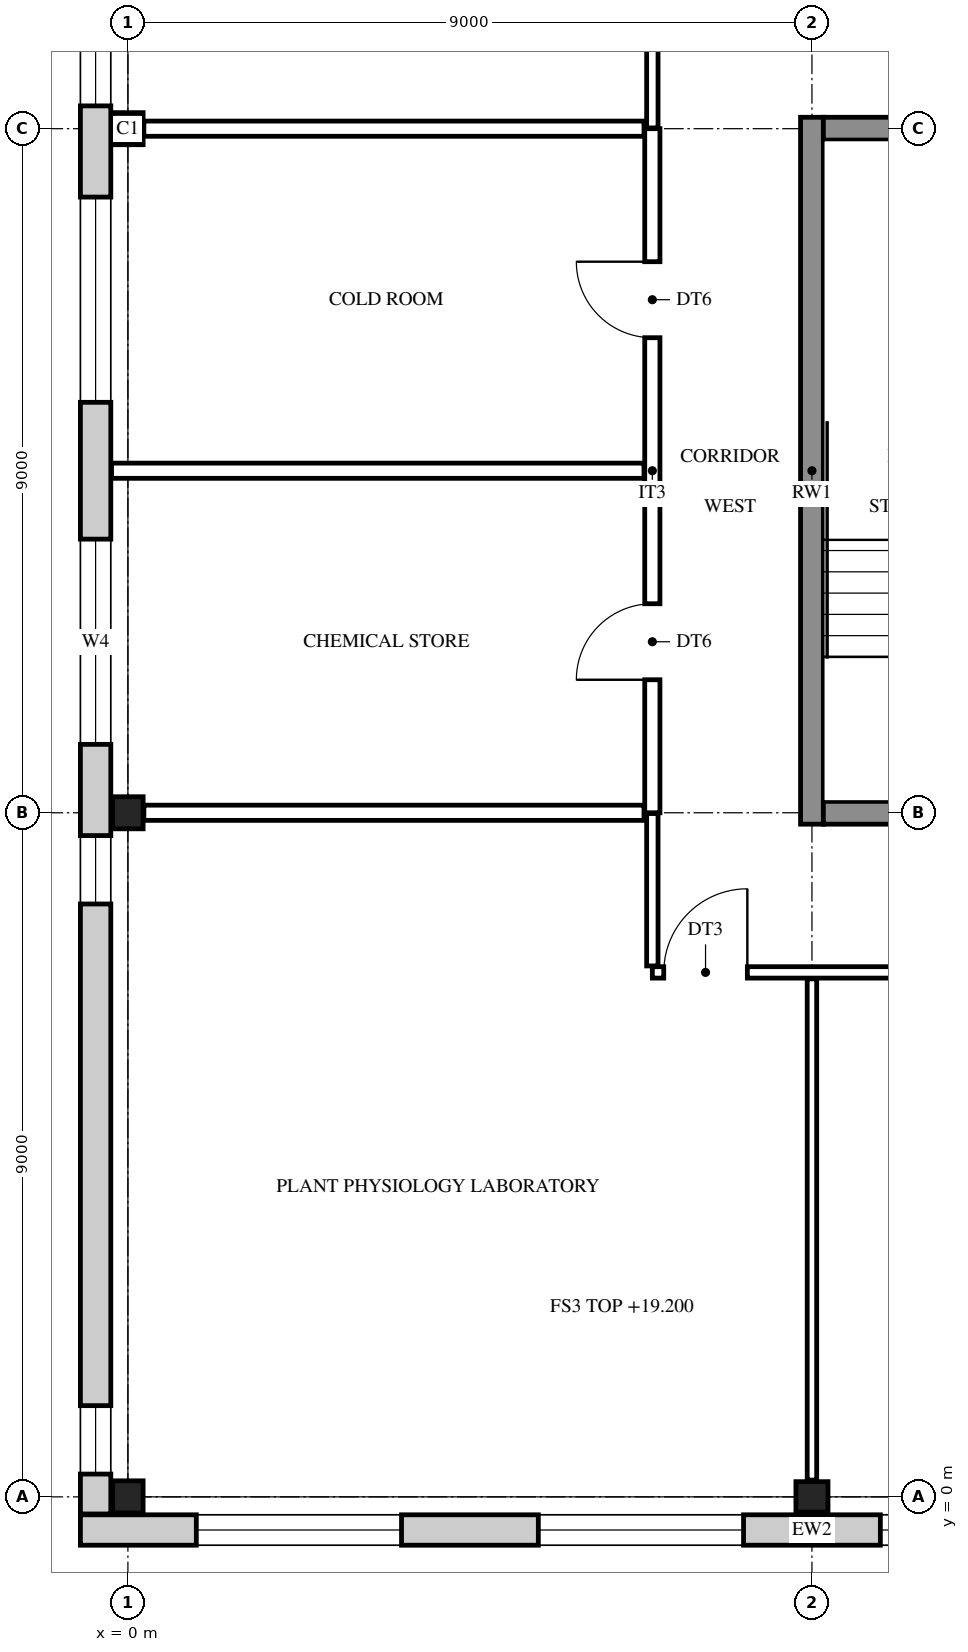
"""IFC4 building model, lengths in metres.
Left out: names, types, materials, properties, quantities, classifications, styles, units other than length and angle.
Written with IfcOpenShell. Run it as: python <this file> out.ifc"""

import sys

from ifc_helpers import new_model, si_unit, direction, frame, frame_2d, origin, origin_2d, place, context, subcontext, project, spatial, rectangle, i_section, extrude, element, fill, save


model = new_model("IFC4")
c1 = context("Model", 3, precision=1e-05, world=origin(), true_north=direction((0.0, 1.0)))
c2 = subcontext(c1, "Body", "Model", "MODEL_VIEW")
j1 = project(units=[si_unit("LENGTHUNIT", "METRE"), si_unit("PLANEANGLEUNIT", "RADIAN")], contexts=[c1])
p1 = place(None, origin())
s1 = spatial("IfcSite", under=j1, at=p1, CompositionType="ELEMENT")
p2 = place(p1, origin())
s2 = spatial("IfcBuilding", under=s1, at=p2, CompositionType="ELEMENT")
p3 = place(p2, frame((0.0, 0.0, 19.2)))
s3 = spatial("IfcBuildingStorey", under=s2, at=p3, CompositionType="ELEMENT", Elevation=19.2)
for number, where, z_axis, x_axis in (
    (1, (0.0, 0.0, 0.0), (0.0, 0.0, 1.0), (1.0, 0.0, 0.0)),
    (2, (0.0, 9.0, 0.0), (0.0, 0.0, 1.0), (1.0, 0.0, 0.0)),
    (3, (0.0, 18.0, 0.0), (0.0, 0.0, 1.0), (1.0, 0.0, 0.0)),
    (4, (9.0, 0.0, 0.0), (0.0, 0.0, 1.0), (0.0, 1.0, 0.0)),
):
    element("IfcColumn", number, at=place(p3, frame(where, z_axis=z_axis, x_axis=x_axis)), inside=s3, PredefinedType="COLUMN", context=c2, shape_type="SweptSolid", body=[
        extrude(i_section(OverallWidth=0.4, OverallDepth=0.422, WebThickness=0.028, FlangeThickness=0.036, at=origin_2d()), origin(), (0.0, 0.0, 1.0), 4.2),
    ])
p4 = place(p3, frame((9.0, 8.85, 0.0), z_axis=(0.0, 0.0, 1.0), x_axis=(0.0, 1.0, 0.0)))
e5 = element("IfcWall", 5, at=p4, inside=s3, PredefinedType="SHEAR", context=c2, shape_type="SweptSolid", body=[
    extrude(rectangle(XDim=9.3, YDim=0.3, at=frame_2d((4.65, 0.0))), origin(), (0.0, 0.0, 1.0), 4.2),
])
p5 = place(p3, frame((9.15, 9.0, 0.0), z_axis=(0.0, 0.0, 1.0), x_axis=(1.0, 0.0, 0.0)))
e6 = element("IfcWall", 6, at=p5, inside=s3, PredefinedType="SHEAR", context=c2, shape_type="SweptSolid", body=[
    extrude(rectangle(XDim=4.2, YDim=0.3, at=frame_2d((2.1, 0.0))), origin(), (0.0, 0.0, 1.0), 4.2),
])
p6 = place(p5, frame((1.5, 0.0, 0.0)))
e7 = element("IfcOpeningElement", 7, at=p6, cuts=e6, PredefinedType="OPENING", context=c2, shape_type="SweptSolid", body=[
    extrude(rectangle(XDim=1.2, YDim=2.1, at=frame_2d((0.6, 1.05))), frame((0.0, 0.16, 0.0), z_axis=(0.0, -1.0, 0.0), x_axis=(1.0, 0.0, 0.0)), (0.0, 0.0, 1.0), 0.32),
])
p7 = place(p3, frame((9.15, 18.0, 0.0), z_axis=(0.0, 0.0, 1.0), x_axis=(1.0, 0.0, 0.0)))
e8 = element("IfcWall", 8, at=p7, inside=s3, PredefinedType="SHEAR", context=c2, shape_type="SweptSolid", body=[
    extrude(rectangle(XDim=4.2, YDim=0.3, at=frame_2d((2.1, 0.0))), origin(), (0.0, 0.0, 1.0), 4.2),
])
p8 = place(p3, frame((32.125, -0.436, 0.0), z_axis=(0.0, 0.0, 1.0), x_axis=(-1.0, 0.0, 0.0)))
e9 = element("IfcWall", 9, at=p8, inside=s3, PredefinedType="STANDARD", context=c2, shape_type="SweptSolid", body=[
    extrude(rectangle(XDim=32.75, YDim=0.4, at=frame_2d((16.375, 0.0))), origin(), (0.0, 0.0, 1.0), 4.2),
])
p9 = place(p8, frame((28.525, 0.0, 0.9)))
e10 = element("IfcOpeningElement", 10, at=p9, cuts=e9, PredefinedType="OPENING", context=c2, shape_type="SweptSolid", body=[
    extrude(rectangle(XDim=2.7, YDim=2.5, at=frame_2d((1.35, 1.25))), frame((0.0, 0.21, 0.0), z_axis=(0.0, -1.0, 0.0), x_axis=(1.0, 0.0, 0.0)), (0.0, 0.0, 1.0), 0.42),
])
p10 = place(p8, frame((24.025, 0.0, 0.9)))
e11 = element("IfcOpeningElement", 11, at=p10, cuts=e9, PredefinedType="OPENING", context=c2, shape_type="SweptSolid", body=[
    extrude(rectangle(XDim=2.7, YDim=2.5, at=frame_2d((1.35, 1.25))), frame((0.0, 0.21, 0.0), z_axis=(0.0, -1.0, 0.0), x_axis=(1.0, 0.0, 0.0)), (0.0, 0.0, 1.0), 0.42),
])
p11 = place(p8, frame((19.525, 0.0, 0.9)))
e12 = element("IfcOpeningElement", 12, at=p11, cuts=e9, PredefinedType="OPENING", context=c2, shape_type="SweptSolid", body=[
    extrude(rectangle(XDim=2.7, YDim=2.5, at=frame_2d((1.35, 1.25))), frame((0.0, 0.21, 0.0), z_axis=(0.0, -1.0, 0.0), x_axis=(1.0, 0.0, 0.0)), (0.0, 0.0, 1.0), 0.42),
])
p12 = place(p8, frame((15.025, 0.0, 0.9)))
e13 = element("IfcOpeningElement", 13, at=p12, cuts=e9, PredefinedType="OPENING", context=c2, shape_type="SweptSolid", body=[
    extrude(rectangle(XDim=2.7, YDim=2.5, at=frame_2d((1.35, 1.25))), frame((0.0, 0.21, 0.0), z_axis=(0.0, -1.0, 0.0), x_axis=(1.0, 0.0, 0.0)), (0.0, 0.0, 1.0), 0.42),
])
p13 = place(p8, frame((10.525, 0.0, 0.9)))
e14 = element("IfcOpeningElement", 14, at=p13, cuts=e9, PredefinedType="OPENING", context=c2, shape_type="SweptSolid", body=[
    extrude(rectangle(XDim=2.7, YDim=2.5, at=frame_2d((1.35, 1.25))), frame((0.0, 0.21, 0.0), z_axis=(0.0, -1.0, 0.0), x_axis=(1.0, 0.0, 0.0)), (0.0, 0.0, 1.0), 0.42),
])
p14 = place(p8, frame((6.025, 0.0, 0.9)))
e15 = element("IfcOpeningElement", 15, at=p14, cuts=e9, PredefinedType="OPENING", context=c2, shape_type="SweptSolid", body=[
    extrude(rectangle(XDim=2.7, YDim=2.5, at=frame_2d((1.35, 1.25))), frame((0.0, 0.21, 0.0), z_axis=(0.0, -1.0, 0.0), x_axis=(1.0, 0.0, 0.0)), (0.0, 0.0, 1.0), 0.42),
])
p15 = place(p8, frame((1.525, 0.0, 0.9)))
e16 = element("IfcOpeningElement", 16, at=p15, cuts=e9, PredefinedType="OPENING", context=c2, shape_type="SweptSolid", body=[
    extrude(rectangle(XDim=2.7, YDim=2.5, at=frame_2d((1.35, 1.25))), frame((0.0, 0.21, 0.0), z_axis=(0.0, -1.0, 0.0), x_axis=(1.0, 0.0, 0.0)), (0.0, 0.0, 1.0), 0.42),
])
p16 = place(p3, frame((-0.425, -0.225, 0.0), z_axis=(0.0, 0.0, 1.0), x_axis=(0.0, 1.0, 0.0)))
e17 = element("IfcWall", 17, at=p16, inside=s3, PredefinedType="STANDARD", context=c2, shape_type="SweptSolid", body=[
    extrude(rectangle(XDim=27.45, YDim=0.4, at=frame_2d((13.725, 0.0))), origin(), (0.0, 0.0, 1.0), 4.2),
])
p17 = place(p16, frame((0.525, 0.0, 0.9)))
e18 = element("IfcOpeningElement", 18, at=p17, cuts=e17, PredefinedType="OPENING", context=c2, shape_type="SweptSolid", body=[
    extrude(rectangle(XDim=0.9, YDim=2.0, at=frame_2d((0.45, 1.0))), frame((0.0, 0.21, 0.0), z_axis=(0.0, -1.0, 0.0), x_axis=(1.0, 0.0, 0.0)), (0.0, 0.0, 1.0), 0.42),
])
p18 = place(p16, frame((8.025, 0.0, 0.9)))
e19 = element("IfcOpeningElement", 19, at=p18, cuts=e17, PredefinedType="OPENING", context=c2, shape_type="SweptSolid", body=[
    extrude(rectangle(XDim=0.9, YDim=2.0, at=frame_2d((0.45, 1.0))), frame((0.0, 0.21, 0.0), z_axis=(0.0, -1.0, 0.0), x_axis=(1.0, 0.0, 0.0)), (0.0, 0.0, 1.0), 0.42),
])
p19 = place(p16, frame((10.125, 0.0, 0.9)))
e20 = element("IfcOpeningElement", 20, at=p19, cuts=e17, PredefinedType="OPENING", context=c2, shape_type="SweptSolid", body=[
    extrude(rectangle(XDim=2.7, YDim=2.5, at=frame_2d((1.35, 1.25))), frame((0.0, 0.21, 0.0), z_axis=(0.0, -1.0, 0.0), x_axis=(1.0, 0.0, 0.0)), (0.0, 0.0, 1.0), 0.42),
])
p20 = place(p16, frame((14.625, 0.0, 0.9)))
e21 = element("IfcOpeningElement", 21, at=p20, cuts=e17, PredefinedType="OPENING", context=c2, shape_type="SweptSolid", body=[
    extrude(rectangle(XDim=2.7, YDim=2.5, at=frame_2d((1.35, 1.25))), frame((0.0, 0.21, 0.0), z_axis=(0.0, -1.0, 0.0), x_axis=(1.0, 0.0, 0.0)), (0.0, 0.0, 1.0), 0.42),
])
p21 = place(p16, frame((18.525, 0.0, 0.9)))
e22 = element("IfcOpeningElement", 22, at=p21, cuts=e17, PredefinedType="OPENING", context=c2, shape_type="SweptSolid", body=[
    extrude(rectangle(XDim=0.9, YDim=2.0, at=frame_2d((0.45, 1.0))), frame((0.0, 0.21, 0.0), z_axis=(0.0, -1.0, 0.0), x_axis=(1.0, 0.0, 0.0)), (0.0, 0.0, 1.0), 0.42),
])
p22 = place(p16, frame((26.025, 0.0, 0.9)))
e23 = element("IfcOpeningElement", 23, at=p22, cuts=e17, PredefinedType="OPENING", context=c2, shape_type="SweptSolid", body=[
    extrude(rectangle(XDim=0.9, YDim=2.0, at=frame_2d((0.45, 1.0))), frame((0.0, 0.21, 0.0), z_axis=(0.0, -1.0, 0.0), x_axis=(1.0, 0.0, 0.0)), (0.0, 0.0, 1.0), 0.42),
])
p23 = place(p3, frame((6.9, 6.985, 0.0), z_axis=(0.0, 0.0, 1.0), x_axis=(0.0, 1.0, 0.0)))
e24 = element("IfcWall", 24, at=p23, inside=s3, PredefinedType="PARTITIONING", context=c2, shape_type="SweptSolid", body=[
    extrude(rectangle(XDim=2.005, YDim=0.15, at=frame_2d((1.002, 0.0))), origin(), (0.0, 0.0, 1.0), 3.537),
])
p24 = place(p3, frame((6.9, 9.0, 0.0), z_axis=(0.0, 0.0, 1.0), x_axis=(0.0, 1.0, 0.0)))
e25 = element("IfcWall", 25, at=p24, inside=s3, PredefinedType="PARTITIONING", context=c2, shape_type="SweptSolid", body=[
    extrude(rectangle(XDim=9.0, YDim=0.2, at=frame_2d((4.5, 0.0))), origin(), (0.0, 0.0, 1.0), 3.537),
])
p25 = place(p24, frame((1.75, 0.0, 0.0)))
e26 = element("IfcOpeningElement", 26, at=p25, cuts=e25, PredefinedType="OPENING", context=c2, shape_type="SweptSolid", body=[
    extrude(rectangle(XDim=1.0, YDim=2.1, at=frame_2d((0.5, 1.05))), frame((0.0, 0.11, 0.0), z_axis=(0.0, -1.0, 0.0), x_axis=(1.0, 0.0, 0.0)), (0.0, 0.0, 1.0), 0.22),
])
p26 = place(p24, frame((6.25, 0.0, 0.0)))
e27 = element("IfcOpeningElement", 27, at=p26, cuts=e25, PredefinedType="OPENING", context=c2, shape_type="SweptSolid", body=[
    extrude(rectangle(XDim=1.0, YDim=2.1, at=frame_2d((0.5, 1.05))), frame((0.0, 0.11, 0.0), z_axis=(0.0, -1.0, 0.0), x_axis=(1.0, 0.0, 0.0)), (0.0, 0.0, 1.0), 0.22),
])
p27 = place(p3, frame((6.9, 18.01, 0.0), z_axis=(0.0, 0.0, 1.0), x_axis=(0.0, 1.0, 0.0)))
e28 = element("IfcWall", 28, at=p27, inside=s3, PredefinedType="PARTITIONING", context=c2, shape_type="SweptSolid", body=[
    extrude(rectangle(XDim=2.005, YDim=0.15, at=frame_2d((1.002, 0.0))), origin(), (0.0, 0.0, 1.0), 3.537),
])
p28 = place(p3, frame((9.0, 0.221, 0.0), z_axis=(0.0, 0.0, 1.0), x_axis=(0.0, 1.0, 0.0)))
e29 = element("IfcWall", 29, at=p28, inside=s3, PredefinedType="PARTITIONING", context=c2, shape_type="SweptSolid", body=[
    extrude(rectangle(XDim=6.594, YDim=0.125, at=frame_2d((3.297, 0.0))), origin(), (0.0, 0.0, 1.0), 3.537),
])
p29 = place(p3, frame((6.9, 6.9, 0.0), z_axis=(0.0, 0.0, 1.0), x_axis=(1.0, 0.0, 0.0)))
e30 = element("IfcWall", 30, at=p29, inside=s3, PredefinedType="PARTITIONING", context=c2, shape_type="SweptSolid", body=[
    extrude(rectangle(XDim=20.1, YDim=0.15, at=frame_2d((10.05, 0.0))), origin(), (0.0, 0.0, 1.0), 3.537),
])
p30 = place(p29, frame((0.15, 0.0, 0.0)))
e31 = element("IfcOpeningElement", 31, at=p30, cuts=e30, PredefinedType="OPENING", context=c2, shape_type="SweptSolid", body=[
    extrude(rectangle(XDim=1.1, YDim=2.1, at=frame_2d((0.55, 1.05))), frame((0.0, 0.085, 0.0), z_axis=(0.0, -1.0, 0.0), x_axis=(1.0, 0.0, 0.0)), (0.0, 0.0, 1.0), 0.17),
])
p31 = place(p29, frame((6.05, 0.0, 0.0)))
e32 = element("IfcOpeningElement", 32, at=p31, cuts=e30, PredefinedType="OPENING", context=c2, shape_type="SweptSolid", body=[
    extrude(rectangle(XDim=1.1, YDim=2.1, at=frame_2d((0.55, 1.05))), frame((0.0, 0.085, 0.0), z_axis=(0.0, -1.0, 0.0), x_axis=(1.0, 0.0, 0.0)), (0.0, 0.0, 1.0), 0.17),
])
p32 = place(p29, frame((16.25, 0.0, 0.0)))
e33 = element("IfcOpeningElement", 33, at=p32, cuts=e30, PredefinedType="OPENING", context=c2, shape_type="SweptSolid", body=[
    extrude(rectangle(XDim=1.1, YDim=2.1, at=frame_2d((0.55, 1.05))), frame((0.0, 0.085, 0.0), z_axis=(0.0, -1.0, 0.0), x_axis=(1.0, 0.0, 0.0)), (0.0, 0.0, 1.0), 0.17),
])
p33 = place(p3, frame((0.21, 9.0, 0.0), z_axis=(0.0, 0.0, 1.0), x_axis=(1.0, 0.0, 0.0)))
e34 = element("IfcWall", 34, at=p33, inside=s3, PredefinedType="PARTITIONING", context=c2, shape_type="SweptSolid", body=[
    extrude(rectangle(XDim=6.58, YDim=0.2, at=frame_2d((3.29, 0.0))), origin(), (0.0, 0.0, 1.0), 3.537),
])
p34 = place(p3, frame((-0.215, 13.5, 0.0), z_axis=(0.0, 0.0, 1.0), x_axis=(1.0, 0.0, 0.0)))
e35 = element("IfcWall", 35, at=p34, inside=s3, PredefinedType="PARTITIONING", context=c2, shape_type="SweptSolid", body=[
    extrude(rectangle(XDim=7.005, YDim=0.2, at=frame_2d((3.502, 0.0))), origin(), (0.0, 0.0, 1.0), 3.537),
])
p35 = place(p3, frame((0.21, 18.0, 0.0), z_axis=(0.0, 0.0, 1.0), x_axis=(1.0, 0.0, 0.0)))
e36 = element("IfcWall", 36, at=p35, inside=s3, PredefinedType="PARTITIONING", context=c2, shape_type="SweptSolid", body=[
    extrude(rectangle(XDim=6.58, YDim=0.2, at=frame_2d((3.29, 0.0))), origin(), (0.0, 0.0, 1.0), 3.537),
])
p36 = place(p9, origin())
e37 = element("IfcWindow", 37, at=p36, inside=s3, PartitioningType="SINGLE_PANEL", PredefinedType="WINDOW", context=c2, shape_type="SweptSolid", body=[
    extrude(rectangle(XDim=2.7, YDim=2.5, at=frame_2d((1.35, 1.25))), frame((0.0, 0.03, 0.0), z_axis=(0.0, -1.0, 0.0), x_axis=(1.0, 0.0, 0.0)), (0.0, 0.0, 1.0), 0.06),
])
fill(e10, e37)
p37 = place(p10, origin())
e38 = element("IfcWindow", 38, at=p37, inside=s3, PartitioningType="SINGLE_PANEL", PredefinedType="WINDOW", context=c2, shape_type="SweptSolid", body=[
    extrude(rectangle(XDim=2.7, YDim=2.5, at=frame_2d((1.35, 1.25))), frame((0.0, 0.03, 0.0), z_axis=(0.0, -1.0, 0.0), x_axis=(1.0, 0.0, 0.0)), (0.0, 0.0, 1.0), 0.06),
])
fill(e11, e38)
p38 = place(p11, origin())
e39 = element("IfcWindow", 39, at=p38, inside=s3, PartitioningType="SINGLE_PANEL", PredefinedType="WINDOW", context=c2, shape_type="SweptSolid", body=[
    extrude(rectangle(XDim=2.7, YDim=2.5, at=frame_2d((1.35, 1.25))), frame((0.0, 0.03, 0.0), z_axis=(0.0, -1.0, 0.0), x_axis=(1.0, 0.0, 0.0)), (0.0, 0.0, 1.0), 0.06),
])
fill(e12, e39)
p39 = place(p17, origin())
e40 = element("IfcWindow", 40, at=p39, inside=s3, PartitioningType="SINGLE_PANEL", PredefinedType="WINDOW", context=c2, shape_type="SweptSolid", body=[
    extrude(rectangle(XDim=0.9, YDim=2.0, at=frame_2d((0.45, 1.0))), frame((0.0, 0.03, 0.0), z_axis=(0.0, -1.0, 0.0), x_axis=(1.0, 0.0, 0.0)), (0.0, 0.0, 1.0), 0.06),
])
fill(e18, e40)
p40 = place(p18, origin())
e41 = element("IfcWindow", 41, at=p40, inside=s3, PartitioningType="SINGLE_PANEL", PredefinedType="WINDOW", context=c2, shape_type="SweptSolid", body=[
    extrude(rectangle(XDim=0.9, YDim=2.0, at=frame_2d((0.45, 1.0))), frame((0.0, 0.03, 0.0), z_axis=(0.0, -1.0, 0.0), x_axis=(1.0, 0.0, 0.0)), (0.0, 0.0, 1.0), 0.06),
])
fill(e19, e41)
p41 = place(p19, origin())
e42 = element("IfcWindow", 42, at=p41, inside=s3, PartitioningType="SINGLE_PANEL", PredefinedType="WINDOW", context=c2, shape_type="SweptSolid", body=[
    extrude(rectangle(XDim=2.7, YDim=2.5, at=frame_2d((1.35, 1.25))), frame((0.0, 0.03, 0.0), z_axis=(0.0, -1.0, 0.0), x_axis=(1.0, 0.0, 0.0)), (0.0, 0.0, 1.0), 0.06),
])
fill(e20, e42)
p42 = place(p20, origin())
e43 = element("IfcWindow", 43, at=p42, inside=s3, PartitioningType="SINGLE_PANEL", PredefinedType="WINDOW", context=c2, shape_type="SweptSolid", body=[
    extrude(rectangle(XDim=2.7, YDim=2.5, at=frame_2d((1.35, 1.25))), frame((0.0, 0.03, 0.0), z_axis=(0.0, -1.0, 0.0), x_axis=(1.0, 0.0, 0.0)), (0.0, 0.0, 1.0), 0.06),
])
fill(e21, e43)
p43 = place(p21, origin())
e44 = element("IfcWindow", 44, at=p43, inside=s3, PartitioningType="SINGLE_PANEL", PredefinedType="WINDOW", context=c2, shape_type="SweptSolid", body=[
    extrude(rectangle(XDim=0.9, YDim=2.0, at=frame_2d((0.45, 1.0))), frame((0.0, 0.03, 0.0), z_axis=(0.0, -1.0, 0.0), x_axis=(1.0, 0.0, 0.0)), (0.0, 0.0, 1.0), 0.06),
])
fill(e22, e44)
p44 = place(p30, frame((1.1, 0.0, 0.0), z_axis=(0.0, 0.0, 1.0), x_axis=(-1.0, 0.0, 0.0)))
e45 = element("IfcDoor", 45, at=p44, inside=s3, OperationType="SINGLE_SWING_RIGHT", PredefinedType="DOOR", context=c2, shape_type="SweptSolid", body=[
    extrude(rectangle(XDim=1.1, YDim=2.1, at=frame_2d((0.55, 1.05))), frame((0.0, 0.025, 0.0), z_axis=(0.0, -1.0, 0.0), x_axis=(1.0, 0.0, 0.0)), (0.0, 0.0, 1.0), 0.05),
])
fill(e31, e45)
p45 = place(p25, origin())
e46 = element("IfcDoor", 46, at=p45, inside=s3, OperationType="SINGLE_SWING_LEFT", PredefinedType="DOOR", context=c2, shape_type="SweptSolid", body=[
    extrude(rectangle(XDim=1.0, YDim=2.1, at=frame_2d((0.5, 1.05))), frame((0.0, 0.025, 0.0), z_axis=(0.0, -1.0, 0.0), x_axis=(1.0, 0.0, 0.0)), (0.0, 0.0, 1.0), 0.05),
])
fill(e26, e46)
p46 = place(p26, origin())
e47 = element("IfcDoor", 47, at=p46, inside=s3, OperationType="SINGLE_SWING_RIGHT", PredefinedType="DOOR", context=c2, shape_type="SweptSolid", body=[
    extrude(rectangle(XDim=1.0, YDim=2.1, at=frame_2d((0.5, 1.05))), frame((0.0, 0.025, 0.0), z_axis=(0.0, -1.0, 0.0), x_axis=(1.0, 0.0, 0.0)), (0.0, 0.0, 1.0), 0.05),
])
fill(e27, e47)
save(model, sys.argv[1])
